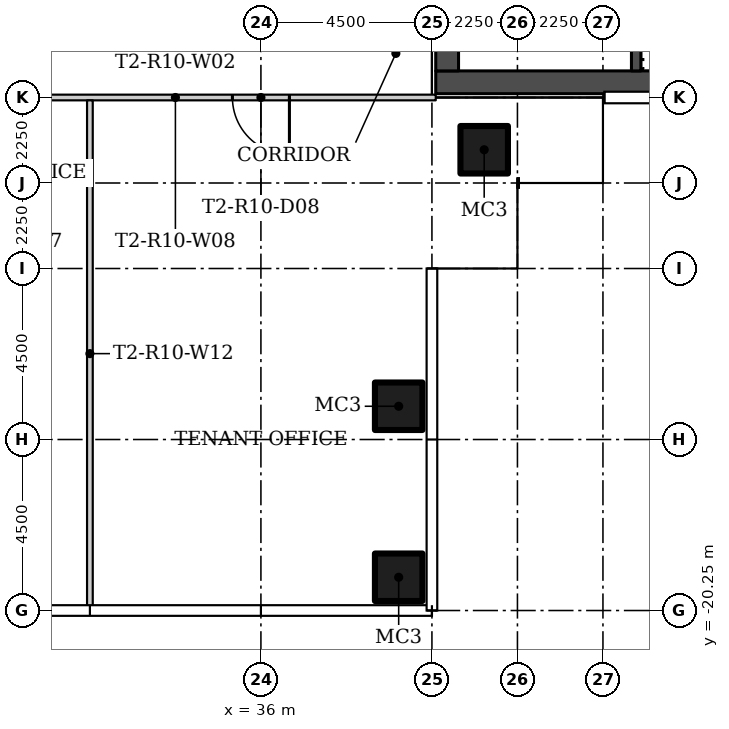
"""IFC4 building model, lengths in metres.
Left out: names, types, materials, properties, quantities, classifications, styles, units other than length and angle.
Written with IfcOpenShell. Run it as: python <this file> out.ifc"""

import sys

from ifc_helpers import new_model, si_unit, direction, frame, frame_2d, origin, origin_2d, place, context, subcontext, project, spatial, rectangle, hollow_rectangle, extrude, element, fill, save


model = new_model("IFC4")
c1 = context("Model", 3, precision=1e-05, world=origin(), true_north=direction((0.0, 1.0)))
c2 = subcontext(c1, "Body", "Model", "MODEL_VIEW")
j1 = project(units=[si_unit("LENGTHUNIT", "METRE"), si_unit("PLANEANGLEUNIT", "RADIAN")], contexts=[c1])
p1 = place(None, origin())
s1 = spatial("IfcSite", under=j1, at=p1, CompositionType="ELEMENT")
p2 = place(p1, origin())
s2 = spatial("IfcBuilding", under=s1, at=p2, CompositionType="ELEMENT")
p3 = place(p2, frame((0.0, 0.0, 101.4)))
s3 = spatial("IfcBuildingStorey", under=s2, at=p3, CompositionType="ELEMENT", Elevation=101.4)
for number, where in (
    (1, (41.875, -8.125, 0.0)),
    (2, (39.625, -14.875, 0.0)),
    (3, (39.625, -19.375, 0.0)),
):
    element("IfcColumn", number, at=place(p3, frame(where)), inside=s3, PredefinedType="COLUMN", context=c2, shape_type="SweptSolid", body=[
        extrude(hollow_rectangle(XDim=1.25, YDim=1.25, WallThickness=0.05, at=origin_2d()), origin(), (0.0, 0.0, 1.0), 3.55),
    ])
p4 = place(p3, frame((40.6, -6.75, 0.0), z_axis=(0.0, 0.0, 1.0), x_axis=(-1.0, 0.0, 0.0)))
e4 = element("IfcWall", 4, at=p4, inside=s3, PredefinedType="PARTITIONING", context=c2, shape_type="SweptSolid", body=[
    extrude(rectangle(XDim=13.7, YDim=0.15, at=frame_2d((6.85, 0.0))), origin(), (0.0, 0.0, 1.0), 3.55),
])
p5 = place(p4, frame((10.9, 0.0, 0.0)))
e5 = element("IfcOpeningElement", 5, at=p5, cuts=e4, PredefinedType="OPENING", context=c2, shape_type="SweptSolid", body=[
    extrude(rectangle(XDim=0.9, YDim=2.1, at=frame_2d((0.45, 1.05))), frame((0.0, 0.085, 0.0), z_axis=(0.0, -1.0, 0.0), x_axis=(1.0, 0.0, 0.0)), (0.0, 0.0, 1.0), 0.17),
])
p6 = place(p4, frame((3.85, 0.0, 0.0)))
e6 = element("IfcOpeningElement", 6, at=p6, cuts=e4, PredefinedType="OPENING", context=c2, shape_type="SweptSolid", body=[
    extrude(rectangle(XDim=1.5, YDim=2.1, at=frame_2d((0.75, 1.05))), frame((0.0, 0.085, 0.0), z_axis=(0.0, -1.0, 0.0), x_axis=(1.0, 0.0, 0.0)), (0.0, 0.0, 1.0), 0.17),
])
p7 = place(p3, frame((31.5, -6.825, 0.0), z_axis=(0.0, 0.0, 1.0), x_axis=(0.0, -1.0, 0.0)))
e7 = element("IfcWall", 7, at=p7, inside=s3, PredefinedType="PARTITIONING", context=c2, shape_type="SweptSolid", body=[
    extrude(rectangle(XDim=13.33, YDim=0.15, at=frame_2d((6.665, 0.0))), origin(), (0.0, 0.0, 1.0), 3.55),
])
p8 = place(p3, frame((53.9, -6.35, 0.0), z_axis=(0.0, 0.0, 1.0), x_axis=(-1.0, 0.0, 0.0)))
e8 = element("IfcWall", 8, at=p8, inside=s3, PredefinedType="SHEAR", context=c2, shape_type="SweptSolid", body=[
    extrude(rectangle(XDim=13.3, YDim=0.6, at=frame_2d((6.65, 0.0))), origin(), (0.0, 0.0, 1.0), 3.55),
])
p9 = place(p3, frame((40.9, -6.05, 0.0), z_axis=(0.0, 0.0, 1.0), x_axis=(0.0, 1.0, 0.0)))
e9 = element("IfcWall", 9, at=p9, inside=s3, PredefinedType="SHEAR", context=c2, shape_type="SweptSolid", body=[
    extrude(rectangle(XDim=12.1, YDim=0.6, at=frame_2d((6.05, 0.0))), origin(), (0.0, 0.0, 1.0), 3.55),
])
p10 = place(p9, frame((0.8, 0.0, 0.0)))
e10 = element("IfcOpeningElement", 10, at=p10, cuts=e9, PredefinedType="OPENING", context=c2, shape_type="SweptSolid", body=[
    extrude(rectangle(XDim=1.2, YDim=2.1, at=frame_2d((0.6, 1.05))), frame((0.0, 0.31, 0.0), z_axis=(0.0, -1.0, 0.0), x_axis=(1.0, 0.0, 0.0)), (0.0, 0.0, 1.0), 0.62),
])
p11 = place(p9, frame((6.4, 0.0, 0.0)))
e11 = element("IfcOpeningElement", 11, at=p11, cuts=e9, PredefinedType="OPENING", context=c2, shape_type="SweptSolid", body=[
    extrude(rectangle(XDim=1.8, YDim=2.4, at=frame_2d((0.9, 1.2))), frame((0.0, 0.31, 0.0), z_axis=(0.0, -1.0, 0.0), x_axis=(1.0, 0.0, 0.0)), (0.0, 0.0, 1.0), 0.62),
])
p12 = place(p3, frame((45.875, -6.05, 0.0), z_axis=(0.0, 0.0, 1.0), x_axis=(0.0, 1.0, 0.0)))
e12 = element("IfcWall", 12, at=p12, inside=s3, PredefinedType="SHEAR", context=c2, shape_type="SweptSolid", body=[
    extrude(rectangle(XDim=2.55, YDim=0.25, at=frame_2d((1.275, 0.0))), origin(), (0.0, 0.0, 1.0), 3.55),
])
p13 = place(p6, origin())
e13 = element("IfcDoor", 13, at=p13, inside=s3, OperationType="DOUBLE_DOOR_SINGLE_SWING", PredefinedType="DOOR", context=c2, shape_type="SweptSolid", body=[
    extrude(rectangle(XDim=1.5, YDim=2.1, at=frame_2d((0.75, 1.05))), frame((0.0, 0.025, 0.0), z_axis=(0.0, -1.0, 0.0), x_axis=(1.0, 0.0, 0.0)), (0.0, 0.0, 1.0), 0.05),
])
fill(e6, e13)
save(model, sys.argv[1])
